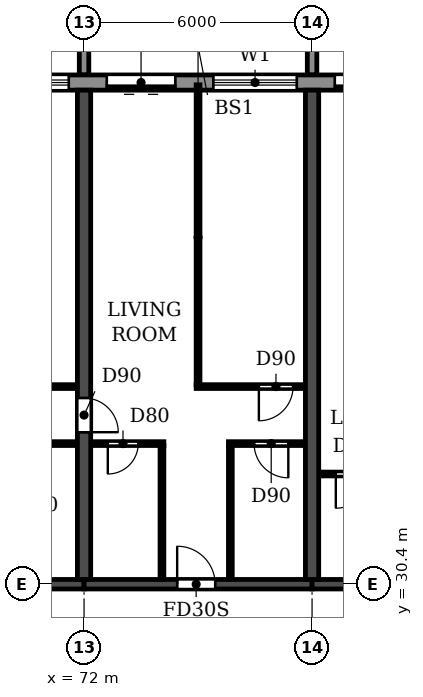
"""IFC4 building model, lengths in metres.
Left out: names, types, materials, properties, quantities, classifications, styles, units other than length and angle.
Written with IfcOpenShell. Run it as: python <this file> out.ifc"""

import sys

from ifc_helpers import new_model, si_unit, direction, frame, frame_2d, origin, place, context, subcontext, project, spatial, polyline, rectangle, outline, extrude, source, transform, mapped, element, fill, save


model = new_model("IFC4")
c1 = context("Model", 3, precision=1e-05, world=origin(), true_north=direction((0.0, 1.0)))
c2 = subcontext(c1, "Body", "Model", "MODEL_VIEW")
j1 = project(units=[si_unit("LENGTHUNIT", "METRE"), si_unit("PLANEANGLEUNIT", "RADIAN")], contexts=[c1])
p1 = place(None, origin())
s1 = spatial("IfcSite", under=j1, at=p1, CompositionType="ELEMENT")
p2 = place(p1, origin())
s2 = spatial("IfcBuilding", under=s1, at=p2, CompositionType="ELEMENT")
p3 = place(p2, frame((0.0, 0.0, 102.6)))
s3 = spatial("IfcBuildingStorey", under=s2, at=p3, CompositionType="ELEMENT", Elevation=102.6)
p4 = place(p3, frame((72.0, 30.525, 0.0), z_axis=(0.0, 0.0, 1.0), x_axis=(0.0, 1.0, 0.0)))
e1 = element("IfcWall", 1, at=p4, inside=s3, PredefinedType="SHEAR", context=c2, shape_type="SweptSolid", body=[
    extrude(rectangle(XDim=12.875, YDim=0.35, at=frame_2d((6.438, 0.0))), origin(), (0.0, 0.0, 1.0), 3.0),
])
p5 = place(p4, frame((3.875, 0.0, 0.0)))
e2 = element("IfcOpeningElement", 2, at=p5, cuts=e1, PredefinedType="OPENING", context=c2, shape_type="SweptSolid", body=[
    extrude(rectangle(XDim=0.9, YDim=2.1, at=frame_2d((0.45, 1.05))), frame((0.0, 0.185, 0.0), z_axis=(0.0, -1.0, 0.0), x_axis=(1.0, 0.0, 0.0)), (0.0, 0.0, 1.0), 0.37),
])
p6 = place(p3, frame((78.0, 30.525, 0.0), z_axis=(0.0, 0.0, 1.0), x_axis=(0.0, 1.0, 0.0)))
e3 = element("IfcWall", 3, at=p6, inside=s3, PredefinedType="SHEAR", context=c2, shape_type="SweptSolid", body=[
    extrude(rectangle(XDim=12.875, YDim=0.35, at=frame_2d((6.438, 0.0))), origin(), (0.0, 0.0, 1.0), 3.0),
])
p7 = place(p3, frame((66.0, 30.4, 0.0), z_axis=(0.0, 0.0, 1.0), x_axis=(1.0, 0.0, 0.0)))
e4 = element("IfcWall", 4, at=p7, inside=s3, PredefinedType="SHEAR", context=c2, shape_type="SweptSolid", body=[
    extrude(rectangle(XDim=6.0, YDim=0.25, at=frame_2d((3.0, 0.0))), origin(), (0.0, 0.0, 1.0), 2.4),
])
p8 = place(p3, frame((72.0, 30.4, 0.0), z_axis=(0.0, 0.0, 1.0), x_axis=(1.0, 0.0, 0.0)))
e5 = element("IfcWall", 5, at=p8, inside=s3, PredefinedType="SHEAR", context=c2, shape_type="SweptSolid", body=[
    extrude(rectangle(XDim=6.0, YDim=0.25, at=frame_2d((3.0, 0.0))), origin(), (0.0, 0.0, 1.0), 2.4),
])
p9 = place(p8, frame((2.45, 0.0, 0.0)))
e6 = element("IfcOpeningElement", 6, at=p9, cuts=e5, PredefinedType="OPENING", context=c2, shape_type="SweptSolid", body=[
    extrude(rectangle(XDim=1.0, YDim=2.1, at=frame_2d((0.5, 1.05))), frame((0.0, 0.135, 0.0), z_axis=(0.0, -1.0, 0.0), x_axis=(1.0, 0.0, 0.0)), (0.0, 0.0, 1.0), 0.27),
])
p10 = place(p3, frame((78.0, 30.4, 0.0), z_axis=(0.0, 0.0, 1.0), x_axis=(1.0, 0.0, 0.0)))
e7 = element("IfcWall", 7, at=p10, inside=s3, PredefinedType="SHEAR", context=c2, shape_type="SweptSolid", body=[
    extrude(rectangle(XDim=6.0, YDim=0.25, at=frame_2d((3.0, 0.0))), origin(), (0.0, 0.0, 1.0), 2.4),
])
p11 = place(p10, frame((2.55, 0.0, 0.0)))
e8 = element("IfcOpeningElement", 8, at=p11, cuts=e7, PredefinedType="OPENING", context=c2, shape_type="SweptSolid", body=[
    extrude(rectangle(XDim=1.0, YDim=2.1, at=frame_2d((0.5, 1.05))), frame((0.0, 0.135, 0.0), z_axis=(0.0, -1.0, 0.0), x_axis=(1.0, 0.0, 0.0)), (0.0, 0.0, 1.0), 0.27),
])
p12 = place(p3, frame((91.317, 43.6, 0.0), z_axis=(0.0, 0.0, 1.0), x_axis=(-1.0, 0.0, 0.0)))
e9 = element("IfcWall", 9, at=p12, inside=s3, PredefinedType="STANDARD", context=c2, shape_type="SweptSolid", body=[
    extrude(rectangle(XDim=80.634, YDim=0.4, at=frame_2d((40.317, 0.0))), origin(), (0.0, 0.0, 1.0), 3.0),
])
p13 = place(p12, frame((76.717, 0.0, 0.9)))
e10 = element("IfcOpeningElement", 10, at=p13, cuts=e9, PredefinedType="OPENING", context=c2, shape_type="SweptSolid", body=[
    extrude(rectangle(XDim=2.2, YDim=1.5, at=frame_2d((1.1, 0.75))), frame((0.0, 0.21, 0.0), z_axis=(0.0, -1.0, 0.0), x_axis=(1.0, 0.0, 0.0)), (0.0, 0.0, 1.0), 0.42),
])
p14 = place(p12, frame((73.917, 0.0, 0.0)))
e11 = element("IfcOpeningElement", 11, at=p14, cuts=e9, PredefinedType="OPENING", context=c2, shape_type="SweptSolid", body=[
    extrude(rectangle(XDim=1.8, YDim=2.4, at=frame_2d((0.9, 1.2))), frame((0.0, 0.21, 0.0), z_axis=(0.0, -1.0, 0.0), x_axis=(1.0, 0.0, 0.0)), (0.0, 0.0, 1.0), 0.42),
])
p15 = place(p12, frame((70.717, 0.0, 0.9)))
e12 = element("IfcOpeningElement", 12, at=p15, cuts=e9, PredefinedType="OPENING", context=c2, shape_type="SweptSolid", body=[
    extrude(rectangle(XDim=2.2, YDim=1.5, at=frame_2d((1.1, 0.75))), frame((0.0, 0.21, 0.0), z_axis=(0.0, -1.0, 0.0), x_axis=(1.0, 0.0, 0.0)), (0.0, 0.0, 1.0), 0.42),
])
p16 = place(p12, frame((67.717, 0.0, 0.9)))
e13 = element("IfcOpeningElement", 13, at=p16, cuts=e9, PredefinedType="OPENING", context=c2, shape_type="SweptSolid", body=[
    extrude(rectangle(XDim=2.2, YDim=1.5, at=frame_2d((1.1, 0.75))), frame((0.0, 0.21, 0.0), z_axis=(0.0, -1.0, 0.0), x_axis=(1.0, 0.0, 0.0)), (0.0, 0.0, 1.0), 0.42),
])
p17 = place(p12, frame((64.917, 0.0, 0.0)))
e14 = element("IfcOpeningElement", 14, at=p17, cuts=e9, PredefinedType="OPENING", context=c2, shape_type="SweptSolid", body=[
    extrude(rectangle(XDim=1.8, YDim=2.4, at=frame_2d((0.9, 1.2))), frame((0.0, 0.21, 0.0), z_axis=(0.0, -1.0, 0.0), x_axis=(1.0, 0.0, 0.0)), (0.0, 0.0, 1.0), 0.42),
])
p18 = place(p12, frame((61.717, 0.0, 0.9)))
e15 = element("IfcOpeningElement", 15, at=p18, cuts=e9, PredefinedType="OPENING", context=c2, shape_type="SweptSolid", body=[
    extrude(rectangle(XDim=2.2, YDim=1.5, at=frame_2d((1.1, 0.75))), frame((0.0, 0.21, 0.0), z_axis=(0.0, -1.0, 0.0), x_axis=(1.0, 0.0, 0.0)), (0.0, 0.0, 1.0), 0.42),
])
p19 = place(p12, frame((58.717, 0.0, 0.9)))
e16 = element("IfcOpeningElement", 16, at=p19, cuts=e9, PredefinedType="OPENING", context=c2, shape_type="SweptSolid", body=[
    extrude(rectangle(XDim=2.2, YDim=1.5, at=frame_2d((1.1, 0.75))), frame((0.0, 0.21, 0.0), z_axis=(0.0, -1.0, 0.0), x_axis=(1.0, 0.0, 0.0)), (0.0, 0.0, 1.0), 0.42),
])
p20 = place(p12, frame((55.717, 0.0, 0.9)))
e17 = element("IfcOpeningElement", 17, at=p20, cuts=e9, PredefinedType="OPENING", context=c2, shape_type="SweptSolid", body=[
    extrude(rectangle(XDim=2.2, YDim=1.5, at=frame_2d((1.1, 0.75))), frame((0.0, 0.21, 0.0), z_axis=(0.0, -1.0, 0.0), x_axis=(1.0, 0.0, 0.0)), (0.0, 0.0, 1.0), 0.42),
])
p21 = place(p12, frame((52.717, 0.0, 0.9)))
e18 = element("IfcOpeningElement", 18, at=p21, cuts=e9, PredefinedType="OPENING", context=c2, shape_type="SweptSolid", body=[
    extrude(rectangle(XDim=2.2, YDim=1.5, at=frame_2d((1.1, 0.75))), frame((0.0, 0.21, 0.0), z_axis=(0.0, -1.0, 0.0), x_axis=(1.0, 0.0, 0.0)), (0.0, 0.0, 1.0), 0.42),
])
p22 = place(p12, frame((49.917, 0.0, 0.0)))
e19 = element("IfcOpeningElement", 19, at=p22, cuts=e9, PredefinedType="OPENING", context=c2, shape_type="SweptSolid", body=[
    extrude(rectangle(XDim=1.8, YDim=2.4, at=frame_2d((0.9, 1.2))), frame((0.0, 0.21, 0.0), z_axis=(0.0, -1.0, 0.0), x_axis=(1.0, 0.0, 0.0)), (0.0, 0.0, 1.0), 0.42),
])
p23 = place(p12, frame((46.717, 0.0, 0.9)))
e20 = element("IfcOpeningElement", 20, at=p23, cuts=e9, PredefinedType="OPENING", context=c2, shape_type="SweptSolid", body=[
    extrude(rectangle(XDim=2.2, YDim=1.5, at=frame_2d((1.1, 0.75))), frame((0.0, 0.21, 0.0), z_axis=(0.0, -1.0, 0.0), x_axis=(1.0, 0.0, 0.0)), (0.0, 0.0, 1.0), 0.42),
])
p24 = place(p12, frame((43.917, 0.0, 0.0)))
e21 = element("IfcOpeningElement", 21, at=p24, cuts=e9, PredefinedType="OPENING", context=c2, shape_type="SweptSolid", body=[
    extrude(rectangle(XDim=1.8, YDim=2.4, at=frame_2d((0.9, 1.2))), frame((0.0, 0.21, 0.0), z_axis=(0.0, -1.0, 0.0), x_axis=(1.0, 0.0, 0.0)), (0.0, 0.0, 1.0), 0.42),
])
p25 = place(p12, frame((40.717, 0.0, 0.9)))
e22 = element("IfcOpeningElement", 22, at=p25, cuts=e9, PredefinedType="OPENING", context=c2, shape_type="SweptSolid", body=[
    extrude(rectangle(XDim=2.2, YDim=1.5, at=frame_2d((1.1, 0.75))), frame((0.0, 0.21, 0.0), z_axis=(0.0, -1.0, 0.0), x_axis=(1.0, 0.0, 0.0)), (0.0, 0.0, 1.0), 0.42),
])
p26 = place(p12, frame((37.717, 0.0, 0.9)))
e23 = element("IfcOpeningElement", 23, at=p26, cuts=e9, PredefinedType="OPENING", context=c2, shape_type="SweptSolid", body=[
    extrude(rectangle(XDim=2.2, YDim=1.5, at=frame_2d((1.1, 0.75))), frame((0.0, 0.21, 0.0), z_axis=(0.0, -1.0, 0.0), x_axis=(1.0, 0.0, 0.0)), (0.0, 0.0, 1.0), 0.42),
])
p27 = place(p12, frame((34.917, 0.0, 0.0)))
e24 = element("IfcOpeningElement", 24, at=p27, cuts=e9, PredefinedType="OPENING", context=c2, shape_type="SweptSolid", body=[
    extrude(rectangle(XDim=1.8, YDim=2.4, at=frame_2d((0.9, 1.2))), frame((0.0, 0.21, 0.0), z_axis=(0.0, -1.0, 0.0), x_axis=(1.0, 0.0, 0.0)), (0.0, 0.0, 1.0), 0.42),
])
p28 = place(p12, frame((31.717, 0.0, 0.9)))
e25 = element("IfcOpeningElement", 25, at=p28, cuts=e9, PredefinedType="OPENING", context=c2, shape_type="SweptSolid", body=[
    extrude(rectangle(XDim=2.2, YDim=1.5, at=frame_2d((1.1, 0.75))), frame((0.0, 0.21, 0.0), z_axis=(0.0, -1.0, 0.0), x_axis=(1.0, 0.0, 0.0)), (0.0, 0.0, 1.0), 0.42),
])
p29 = place(p12, frame((28.717, 0.0, 0.9)))
e26 = element("IfcOpeningElement", 26, at=p29, cuts=e9, PredefinedType="OPENING", context=c2, shape_type="SweptSolid", body=[
    extrude(rectangle(XDim=2.2, YDim=1.5, at=frame_2d((1.1, 0.75))), frame((0.0, 0.21, 0.0), z_axis=(0.0, -1.0, 0.0), x_axis=(1.0, 0.0, 0.0)), (0.0, 0.0, 1.0), 0.42),
])
p30 = place(p12, frame((25.917, 0.0, 0.0)))
e27 = element("IfcOpeningElement", 27, at=p30, cuts=e9, PredefinedType="OPENING", context=c2, shape_type="SweptSolid", body=[
    extrude(rectangle(XDim=1.8, YDim=2.4, at=frame_2d((0.9, 1.2))), frame((0.0, 0.21, 0.0), z_axis=(0.0, -1.0, 0.0), x_axis=(1.0, 0.0, 0.0)), (0.0, 0.0, 1.0), 0.42),
])
p31 = place(p12, frame((22.717, 0.0, 0.9)))
e28 = element("IfcOpeningElement", 28, at=p31, cuts=e9, PredefinedType="OPENING", context=c2, shape_type="SweptSolid", body=[
    extrude(rectangle(XDim=2.2, YDim=1.5, at=frame_2d((1.1, 0.75))), frame((0.0, 0.21, 0.0), z_axis=(0.0, -1.0, 0.0), x_axis=(1.0, 0.0, 0.0)), (0.0, 0.0, 1.0), 0.42),
])
p32 = place(p12, frame((19.717, 0.0, 0.9)))
e29 = element("IfcOpeningElement", 29, at=p32, cuts=e9, PredefinedType="OPENING", context=c2, shape_type="SweptSolid", body=[
    extrude(rectangle(XDim=2.2, YDim=1.5, at=frame_2d((1.1, 0.75))), frame((0.0, 0.21, 0.0), z_axis=(0.0, -1.0, 0.0), x_axis=(1.0, 0.0, 0.0)), (0.0, 0.0, 1.0), 0.42),
])
p33 = place(p12, frame((16.917, 0.0, 0.0)))
e30 = element("IfcOpeningElement", 30, at=p33, cuts=e9, PredefinedType="OPENING", context=c2, shape_type="SweptSolid", body=[
    extrude(rectangle(XDim=1.8, YDim=2.4, at=frame_2d((0.9, 1.2))), frame((0.0, 0.21, 0.0), z_axis=(0.0, -1.0, 0.0), x_axis=(1.0, 0.0, 0.0)), (0.0, 0.0, 1.0), 0.42),
])
p34 = place(p12, frame((13.717, 0.0, 0.9)))
e31 = element("IfcOpeningElement", 31, at=p34, cuts=e9, PredefinedType="OPENING", context=c2, shape_type="SweptSolid", body=[
    extrude(rectangle(XDim=2.2, YDim=1.5, at=frame_2d((1.1, 0.75))), frame((0.0, 0.21, 0.0), z_axis=(0.0, -1.0, 0.0), x_axis=(1.0, 0.0, 0.0)), (0.0, 0.0, 1.0), 0.42),
])
p35 = place(p12, frame((10.917, 0.0, 0.0)))
e32 = element("IfcOpeningElement", 32, at=p35, cuts=e9, PredefinedType="OPENING", context=c2, shape_type="SweptSolid", body=[
    extrude(rectangle(XDim=1.8, YDim=2.4, at=frame_2d((0.9, 1.2))), frame((0.0, 0.21, 0.0), z_axis=(0.0, -1.0, 0.0), x_axis=(1.0, 0.0, 0.0)), (0.0, 0.0, 1.0), 0.42),
])
p36 = place(p12, frame((7.717, 0.0, 0.9)))
e33 = element("IfcOpeningElement", 33, at=p36, cuts=e9, PredefinedType="OPENING", context=c2, shape_type="SweptSolid", body=[
    extrude(rectangle(XDim=2.2, YDim=1.5, at=frame_2d((1.1, 0.75))), frame((0.0, 0.21, 0.0), z_axis=(0.0, -1.0, 0.0), x_axis=(1.0, 0.0, 0.0)), (0.0, 0.0, 1.0), 0.42),
])
p37 = place(p12, frame((4.717, 0.0, 0.9)))
e34 = element("IfcOpeningElement", 34, at=p37, cuts=e9, PredefinedType="OPENING", context=c2, shape_type="SweptSolid", body=[
    extrude(rectangle(XDim=2.2, YDim=1.5, at=frame_2d((1.1, 0.75))), frame((0.0, 0.21, 0.0), z_axis=(0.0, -1.0, 0.0), x_axis=(1.0, 0.0, 0.0)), (0.0, 0.0, 1.0), 0.42),
])
p38 = place(p12, frame((1.917, 0.0, 0.0)))
e35 = element("IfcOpeningElement", 35, at=p38, cuts=e9, PredefinedType="OPENING", context=c2, shape_type="SweptSolid", body=[
    extrude(rectangle(XDim=1.8, YDim=2.4, at=frame_2d((0.9, 1.2))), frame((0.0, 0.21, 0.0), z_axis=(0.0, -1.0, 0.0), x_axis=(1.0, 0.0, 0.0)), (0.0, 0.0, 1.0), 0.42),
])
m1 = source(origin(), c2, "Body", "SweptSolid", [
    extrude(outline(polyline([(0.0, 0.0), (0.25, 0.0), (0.25, 3.1), (0.0, 3.1), (0.0, 0.0)])), origin(), (0.0, 0.0, 1.0), 3.1),
])
for number, where in (
    (36, (71.875, 43.8, 0.0)),
    (37, (77.875, 43.8, 0.0)),
):
    element("IfcWall", number, at=place(p3, frame(where)), inside=s3, PredefinedType="STANDARD", context=c2, shape_type="MappedRepresentation", body=[
        mapped(m1, transform((0.0, 0.0, 0.0))),
    ])
p39 = place(p3, frame((78.185, 33.3, 0.0), z_axis=(0.0, 0.0, 1.0), x_axis=(1.0, 0.0, 0.0)))
e38 = element("IfcWall", 38, at=p39, inside=s3, PredefinedType="PARTITIONING", context=c2, shape_type="SweptSolid", body=[
    extrude(rectangle(XDim=2.015, YDim=0.1, at=frame_2d((1.007, 0.0))), origin(), (0.0, 0.0, 1.0), 3.0),
])
p40 = place(p39, frame((0.44, 0.0, 0.0)))
e39 = element("IfcOpeningElement", 39, at=p40, cuts=e38, PredefinedType="OPENING", context=c2, shape_type="SweptSolid", body=[
    extrude(rectangle(XDim=0.9, YDim=2.1, at=frame_2d((0.45, 1.05))), frame((0.0, 0.06, 0.0), z_axis=(0.0, -1.0, 0.0), x_axis=(1.0, 0.0, 0.0)), (0.0, 0.0, 1.0), 0.12),
])
p41 = place(p3, frame((68.65, 34.1, 0.0), z_axis=(0.0, 0.0, 1.0), x_axis=(1.0, 0.0, 0.0)))
e40 = element("IfcWall", 40, at=p41, inside=s3, PredefinedType="PARTITIONING", context=c2, shape_type="SweptSolid", body=[
    extrude(rectangle(XDim=3.165, YDim=0.1, at=frame_2d((1.583, 0.0))), origin(), (0.0, 0.0, 1.0), 3.0),
])
p42 = place(p41, frame((1.3, 0.0, 0.0)))
e41 = element("IfcOpeningElement", 41, at=p42, cuts=e40, PredefinedType="OPENING", context=c2, shape_type="SweptSolid", body=[
    extrude(rectangle(XDim=0.8, YDim=2.1, at=frame_2d((0.4, 1.05))), frame((0.0, 0.06, 0.0), z_axis=(0.0, -1.0, 0.0), x_axis=(1.0, 0.0, 0.0)), (0.0, 0.0, 1.0), 0.12),
])
p43 = place(p3, frame((72.185, 34.1, 0.0), z_axis=(0.0, 0.0, 1.0), x_axis=(1.0, 0.0, 0.0)))
e42 = element("IfcWall", 42, at=p43, inside=s3, PredefinedType="PARTITIONING", context=c2, shape_type="SweptSolid", body=[
    extrude(rectangle(XDim=1.915, YDim=0.1, at=frame_2d((0.958, 0.0))), origin(), (0.0, 0.0, 1.0), 3.0),
])
p44 = place(p43, frame((0.44, 0.0, 0.0)))
e43 = element("IfcOpeningElement", 43, at=p44, cuts=e42, PredefinedType="OPENING", context=c2, shape_type="SweptSolid", body=[
    extrude(rectangle(XDim=0.8, YDim=2.1, at=frame_2d((0.4, 1.05))), frame((0.0, 0.06, 0.0), z_axis=(0.0, -1.0, 0.0), x_axis=(1.0, 0.0, 0.0)), (0.0, 0.0, 1.0), 0.12),
])
p45 = place(p3, frame((75.8, 34.1, 0.0), z_axis=(0.0, 0.0, 1.0), x_axis=(1.0, 0.0, 0.0)))
e44 = element("IfcWall", 44, at=p45, inside=s3, PredefinedType="PARTITIONING", context=c2, shape_type="SweptSolid", body=[
    extrude(rectangle(XDim=2.015, YDim=0.1, at=frame_2d((1.007, 0.0))), origin(), (0.0, 0.0, 1.0), 3.0),
])
p46 = place(p45, frame((0.675, 0.0, 0.0)))
e45 = element("IfcOpeningElement", 45, at=p46, cuts=e44, PredefinedType="OPENING", context=c2, shape_type="SweptSolid", body=[
    extrude(rectangle(XDim=0.9, YDim=2.1, at=frame_2d((0.45, 1.05))), frame((0.0, 0.06, 0.0), z_axis=(0.0, -1.0, 0.0), x_axis=(1.0, 0.0, 0.0)), (0.0, 0.0, 1.0), 0.12),
])
p47 = place(p3, frame((66.185, 35.6, 0.0), z_axis=(0.0, 0.0, 1.0), x_axis=(1.0, 0.0, 0.0)))
e46 = element("IfcWall", 46, at=p47, inside=s3, PredefinedType="PARTITIONING", context=c2, shape_type="SweptSolid", body=[
    extrude(rectangle(XDim=5.63, YDim=0.1, at=frame_2d((2.815, 0.0))), origin(), (0.0, 0.0, 1.0), 3.0),
])
p48 = place(p47, frame((1.415, 0.0, 0.0)))
e47 = element("IfcOpeningElement", 47, at=p48, cuts=e46, PredefinedType="OPENING", context=c2, shape_type="SweptSolid", body=[
    extrude(rectangle(XDim=0.9, YDim=2.1, at=frame_2d((0.45, 1.05))), frame((0.0, 0.06, 0.0), z_axis=(0.0, -1.0, 0.0), x_axis=(1.0, 0.0, 0.0)), (0.0, 0.0, 1.0), 0.12),
])
p49 = place(p47, frame((3.315, 0.0, 0.0)))
e48 = element("IfcOpeningElement", 48, at=p49, cuts=e46, PredefinedType="OPENING", context=c2, shape_type="SweptSolid", body=[
    extrude(rectangle(XDim=0.9, YDim=2.1, at=frame_2d((0.45, 1.05))), frame((0.0, 0.06, 0.0), z_axis=(0.0, -1.0, 0.0), x_axis=(1.0, 0.0, 0.0)), (0.0, 0.0, 1.0), 0.12),
])
p50 = place(p3, frame((74.95, 35.6, 0.0), z_axis=(0.0, 0.0, 1.0), x_axis=(1.0, 0.0, 0.0)))
e49 = element("IfcWall", 49, at=p50, inside=s3, PredefinedType="PARTITIONING", context=c2, shape_type="SweptSolid", body=[
    extrude(rectangle(XDim=2.865, YDim=0.1, at=frame_2d((1.433, 0.0))), origin(), (0.0, 0.0, 1.0), 3.0),
])
p51 = place(p50, frame((1.65, 0.0, 0.0)))
e50 = element("IfcOpeningElement", 50, at=p51, cuts=e49, PredefinedType="OPENING", context=c2, shape_type="SweptSolid", body=[
    extrude(rectangle(XDim=0.9, YDim=2.1, at=frame_2d((0.45, 1.05))), frame((0.0, 0.06, 0.0), z_axis=(0.0, -1.0, 0.0), x_axis=(1.0, 0.0, 0.0)), (0.0, 0.0, 1.0), 0.12),
])
p52 = place(p3, frame((74.05, 30.535, 0.0), z_axis=(0.0, 0.0, 1.0), x_axis=(0.0, 1.0, 0.0)))
e51 = element("IfcWall", 51, at=p52, inside=s3, PredefinedType="PARTITIONING", context=c2, shape_type="SweptSolid", body=[
    extrude(rectangle(XDim=3.515, YDim=0.1, at=frame_2d((1.758, 0.0))), origin(), (0.0, 0.0, 1.0), 3.0),
])
p53 = place(p3, frame((75.0, 35.65, 0.0), z_axis=(0.0, 0.0, 1.0), x_axis=(0.0, 1.0, 0.0)))
e52 = element("IfcWall", 52, at=p53, inside=s3, PredefinedType="PARTITIONING", context=c2, shape_type="SweptSolid", body=[
    extrude(rectangle(XDim=7.89, YDim=0.1, at=frame_2d((3.945, 0.0))), origin(), (0.0, 0.0, 1.0), 3.0),
])
p54 = place(p3, frame((75.85, 30.535, 0.0), z_axis=(0.0, 0.0, 1.0), x_axis=(0.0, 1.0, 0.0)))
e53 = element("IfcWall", 53, at=p54, inside=s3, PredefinedType="PARTITIONING", context=c2, shape_type="SweptSolid", body=[
    extrude(rectangle(XDim=3.515, YDim=0.1, at=frame_2d((1.758, 0.0))), origin(), (0.0, 0.0, 1.0), 3.0),
])
p55 = place(p32, origin())
e54 = element("IfcWindow", 54, at=p55, inside=s3, PartitioningType="DOUBLE_PANEL_HORIZONTAL", PredefinedType="WINDOW", context=c2, shape_type="SweptSolid", body=[
    extrude(rectangle(XDim=2.2, YDim=1.5, at=frame_2d((1.1, 0.75))), frame((0.0, 0.03, 0.0), z_axis=(0.0, -1.0, 0.0), x_axis=(1.0, 0.0, 0.0)), (0.0, 0.0, 1.0), 0.06),
])
fill(e29, e54)
p56 = place(p33, origin())
e55 = element("IfcDoor", 55, at=p56, inside=s3, OperationType="DOUBLE_DOOR_SLIDING", PredefinedType="DOOR", context=c2, shape_type="SweptSolid", body=[
    extrude(rectangle(XDim=1.8, YDim=2.4, at=frame_2d((0.9, 1.2))), frame((0.0, 0.025, 0.0), z_axis=(0.0, -1.0, 0.0), x_axis=(1.0, 0.0, 0.0)), (0.0, 0.0, 1.0), 0.05),
])
fill(e30, e55)
p57 = place(p34, origin())
e56 = element("IfcWindow", 56, at=p57, inside=s3, PartitioningType="DOUBLE_PANEL_HORIZONTAL", PredefinedType="WINDOW", context=c2, shape_type="SweptSolid", body=[
    extrude(rectangle(XDim=2.2, YDim=1.5, at=frame_2d((1.1, 0.75))), frame((0.0, 0.03, 0.0), z_axis=(0.0, -1.0, 0.0), x_axis=(1.0, 0.0, 0.0)), (0.0, 0.0, 1.0), 0.06),
])
fill(e31, e56)
p58 = place(p35, origin())
e57 = element("IfcDoor", 57, at=p58, inside=s3, OperationType="DOUBLE_DOOR_SLIDING", PredefinedType="DOOR", context=c2, shape_type="SweptSolid", body=[
    extrude(rectangle(XDim=1.8, YDim=2.4, at=frame_2d((0.9, 1.2))), frame((0.0, 0.025, 0.0), z_axis=(0.0, -1.0, 0.0), x_axis=(1.0, 0.0, 0.0)), (0.0, 0.0, 1.0), 0.05),
])
fill(e32, e57)
p59 = place(p5, frame((0.9, 0.0, 0.0), z_axis=(0.0, 0.0, 1.0), x_axis=(-1.0, 0.0, 0.0)))
e58 = element("IfcDoor", 58, at=p59, inside=s3, OperationType="SINGLE_SWING_RIGHT", PredefinedType="DOOR", context=c2, shape_type="SweptSolid", body=[
    extrude(rectangle(XDim=0.9, YDim=2.1, at=frame_2d((0.45, 1.05))), frame((0.0, 0.025, 0.0), z_axis=(0.0, -1.0, 0.0), x_axis=(1.0, 0.0, 0.0)), (0.0, 0.0, 1.0), 0.05),
])
fill(e2, e58)
p60 = place(p44, frame((0.8, 0.0, 0.0), z_axis=(0.0, 0.0, 1.0), x_axis=(-1.0, 0.0, 0.0)))
e59 = element("IfcDoor", 59, at=p60, inside=s3, OperationType="SINGLE_SWING_RIGHT", PredefinedType="DOOR", context=c2, shape_type="SweptSolid", body=[
    extrude(rectangle(XDim=0.8, YDim=2.1, at=frame_2d((0.4, 1.05))), frame((0.0, 0.025, 0.0), z_axis=(0.0, -1.0, 0.0), x_axis=(1.0, 0.0, 0.0)), (0.0, 0.0, 1.0), 0.05),
])
fill(e43, e59)
p61 = place(p9, origin())
e60 = element("IfcDoor", 60, at=p61, inside=s3, OperationType="SINGLE_SWING_LEFT", PredefinedType="DOOR", context=c2, shape_type="SweptSolid", body=[
    extrude(rectangle(XDim=1.0, YDim=2.1, at=frame_2d((0.5, 1.05))), frame((0.0, 0.025, 0.0), z_axis=(0.0, -1.0, 0.0), x_axis=(1.0, 0.0, 0.0)), (0.0, 0.0, 1.0), 0.05),
])
fill(e6, e60)
p62 = place(p46, frame((0.9, 0.0, 0.0), z_axis=(0.0, 0.0, 1.0), x_axis=(-1.0, 0.0, 0.0)))
e61 = element("IfcDoor", 61, at=p62, inside=s3, OperationType="SINGLE_SWING_LEFT", PredefinedType="DOOR", context=c2, shape_type="SweptSolid", body=[
    extrude(rectangle(XDim=0.9, YDim=2.1, at=frame_2d((0.45, 1.05))), frame((0.0, 0.025, 0.0), z_axis=(0.0, -1.0, 0.0), x_axis=(1.0, 0.0, 0.0)), (0.0, 0.0, 1.0), 0.05),
])
fill(e45, e61)
p63 = place(p51, frame((0.9, 0.0, 0.0), z_axis=(0.0, 0.0, 1.0), x_axis=(-1.0, 0.0, 0.0)))
e62 = element("IfcDoor", 62, at=p63, inside=s3, OperationType="SINGLE_SWING_RIGHT", PredefinedType="DOOR", context=c2, shape_type="SweptSolid", body=[
    extrude(rectangle(XDim=0.9, YDim=2.1, at=frame_2d((0.45, 1.05))), frame((0.0, 0.025, 0.0), z_axis=(0.0, -1.0, 0.0), x_axis=(1.0, 0.0, 0.0)), (0.0, 0.0, 1.0), 0.05),
])
fill(e50, e62)
p64 = place(p40, frame((0.9, 0.0, 0.0), z_axis=(0.0, 0.0, 1.0), x_axis=(-1.0, 0.0, 0.0)))
e63 = element("IfcDoor", 63, at=p64, inside=s3, OperationType="SINGLE_SWING_RIGHT", PredefinedType="DOOR", context=c2, shape_type="SweptSolid", body=[
    extrude(rectangle(XDim=0.9, YDim=2.1, at=frame_2d((0.45, 1.05))), frame((0.0, 0.025, 0.0), z_axis=(0.0, -1.0, 0.0), x_axis=(1.0, 0.0, 0.0)), (0.0, 0.0, 1.0), 0.05),
])
fill(e39, e63)
save(model, sys.argv[1])
